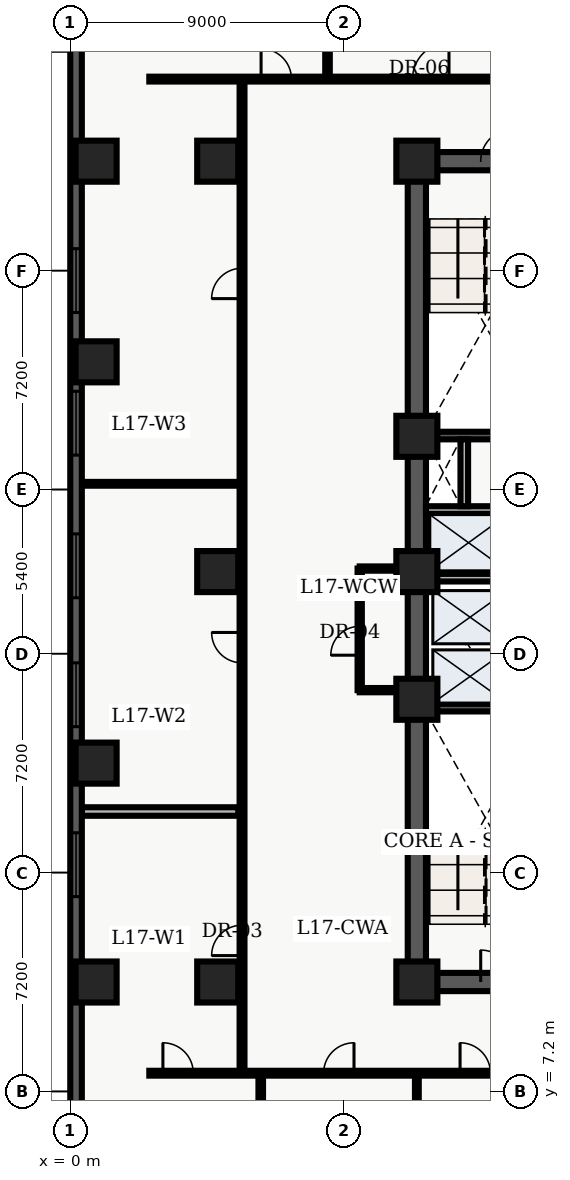
"""IFC4 building model, lengths in metres.
Left out: names, types, materials, properties, quantities, classifications, styles, units other than length and angle.
Written with IfcOpenShell. Run it as: python <this file> out.ifc"""

import sys

from ifc_helpers import new_model, entity, si_unit, converted_unit, direction, frame, origin_with_axes, origin_2d_with_axis, place, context, subcontext, project, spatial, polyline, rectangle, outline, extrude, element, fill, save


model = new_model("IFC4")
c1 = context("Model", 3, precision=1e-05, world=origin_with_axes(), true_north=direction((0.0, 1.0)))
c2 = subcontext(c1, "Body", "Model", "MODEL_VIEW")
j1 = project(units=[si_unit("LENGTHUNIT", "METRE"), converted_unit("PLANEANGLEUNIT", "DEGREE", entity("IfcPlaneAngleMeasure", 0.017), si_unit("PLANEANGLEUNIT", "RADIAN"), dimensions=[0, 0, 0, 0, 0, 0, 0])], contexts=[c1])
p1 = place(None, origin_with_axes())
s1 = spatial("IfcSite", under=j1, at=p1, CompositionType="ELEMENT")
p2 = place(p1, origin_with_axes())
s2 = spatial("IfcBuilding", under=s1, at=p2, CompositionType="ELEMENT")
p3 = place(p2, frame((0.0, 0.0, 71.7), z_axis=(0.0, 0.0, 1.0), x_axis=(1.0, 0.0, 0.0)))
s3 = spatial("IfcBuildingStorey", under=s2, at=p3, CompositionType="ELEMENT", Elevation=71.7)
p4 = place(p3, frame((11.4, 10.8, 0.0), z_axis=(0.0, 0.0, 1.0), x_axis=(0.0, 1.0, 0.0)))
e1 = element("IfcWall", 1, at=p4, inside=s3, PredefinedType="SHEAR", context=c2, shape_type="SweptSolid", body=[
    extrude(outline(polyline([(0.0, -0.3), (27.0, -0.3), (27.0, 0.3), (0.0, 0.3), (0.0, -0.3)])), origin_with_axes(), (0.0, 0.0, 1.0), 3.66),
])
p5 = place(p3, frame((11.4, 10.8, 0.0), z_axis=(0.0, 0.0, 1.0), x_axis=(1.0, 0.0, 0.0)))
e2 = element("IfcWall", 2, at=p5, inside=s3, PredefinedType="SHEAR", context=c2, shape_type="SweptSolid", body=[
    extrude(outline(polyline([(0.0, -0.3), (7.2, -0.3), (7.2, 0.3), (0.0, 0.3), (0.0, -0.3)])), origin_with_axes(), (0.0, 0.0, 1.0), 3.66),
])
p6 = place(p5, frame((2.625, 0.0, 0.0), z_axis=(0.0, 0.0, 1.0), x_axis=(1.0, 0.0, 0.0)))
e3 = element("IfcOpeningElement", 3, at=p6, cuts=e2, PredefinedType="OPENING", context=c2, shape_type="SweptSolid", body=[
    extrude(rectangle(XDim=1.05, YDim=0.62, at=origin_2d_with_axis()), origin_with_axes(), (0.0, 0.0, 1.0), 2.15),
])
p7 = place(p3, frame((11.4, 37.8, 0.0), z_axis=(0.0, 0.0, 1.0), x_axis=(1.0, 0.0, 0.0)))
e4 = element("IfcWall", 4, at=p7, inside=s3, PredefinedType="SHEAR", context=c2, shape_type="SweptSolid", body=[
    extrude(outline(polyline([(0.0, -0.3), (7.2, -0.3), (7.2, 0.3), (0.0, 0.3), (0.0, -0.3)])), origin_with_axes(), (0.0, 0.0, 1.0), 3.66),
])
p8 = place(p7, frame((2.625, 0.0, 0.0), z_axis=(0.0, 0.0, 1.0), x_axis=(1.0, 0.0, 0.0)))
e5 = element("IfcOpeningElement", 5, at=p8, cuts=e4, PredefinedType="OPENING", context=c2, shape_type="SweptSolid", body=[
    extrude(rectangle(XDim=1.05, YDim=0.62, at=origin_2d_with_axis()), origin_with_axes(), (0.0, 0.0, 1.0), 2.15),
])
for number, where, z_axis, x_axis in (
    (6, (11.7, 19.825, 0.0), (0.0, 0.0, 1.0), (1.0, 0.0, 0.0)),
    (7, (11.7, 28.775, 0.0), (0.0, 0.0, 1.0), (1.0, 0.0, 0.0)),
):
    element("IfcWall", number, at=place(p3, frame(where, z_axis=z_axis, x_axis=x_axis)), inside=s3, PredefinedType="SHEAR", context=c2, shape_type="SweptSolid", body=[
        extrude(outline(polyline([(0.0, -0.125), (6.6, -0.125), (6.6, 0.125), (0.0, 0.125), (0.0, -0.125)])), origin_with_axes(), (0.0, 0.0, 1.0), 3.66),
    ])
p9 = place(p3, frame((11.7, 24.1, 0.0), z_axis=(0.0, 0.0, 1.0), x_axis=(1.0, 0.0, 0.0)))
e8 = element("IfcWall", 8, at=p9, inside=s3, PredefinedType="SOLIDWALL", context=c2, shape_type="SweptSolid", body=[
    extrude(outline(polyline([(0.0, -0.125), (6.6, -0.125), (6.6, 0.125), (0.0, 0.125), (0.0, -0.125)])), origin_with_axes(), (0.0, 0.0, 1.0), 2.7),
])
p10 = place(p9, frame((3.75, 0.0, 0.0), z_axis=(0.0, 0.0, 1.0), x_axis=(1.0, 0.0, 0.0)))
e9 = element("IfcOpeningElement", 9, at=p10, cuts=e8, PredefinedType="OPENING", context=c2, shape_type="SweptSolid", body=[
    extrude(rectangle(XDim=0.9, YDim=0.27, at=origin_2d_with_axis()), origin_with_axes(), (0.0, 0.0, 1.0), 2.15),
])
p11 = place(p3, frame((11.7, 26.325, 0.0), z_axis=(0.0, 0.0, 1.0), x_axis=(1.0, 0.0, 0.0)))
e10 = element("IfcWall", 10, at=p11, inside=s3, PredefinedType="SOLIDWALL", context=c2, shape_type="SweptSolid", body=[
    extrude(outline(polyline([(0.0, -0.125), (6.6, -0.125), (6.6, 0.125), (0.0, 0.125), (0.0, -0.125)])), origin_with_axes(), (0.0, 0.0, 1.0), 2.7),
])
p12 = place(p11, frame((3.5, 0.0, 0.0), z_axis=(0.0, 0.0, 1.0), x_axis=(1.0, 0.0, 0.0)))
e11 = element("IfcOpeningElement", 11, at=p12, cuts=e10, PredefinedType="OPENING", context=c2, shape_type="SweptSolid", body=[
    extrude(rectangle(XDim=0.9, YDim=0.27, at=origin_2d_with_axis()), origin_with_axes(), (0.0, 0.0, 1.0), 2.15),
])
p13 = place(p3, frame((12.96, 26.45, 0.0), z_axis=(0.0, 0.0, 1.0), x_axis=(0.0, 1.0, 0.0)))
e12 = element("IfcWall", 12, at=p13, inside=s3, PredefinedType="SOLIDWALL", context=c2, shape_type="SweptSolid", body=[
    extrude(outline(polyline([(0.0, -0.125), (2.2, -0.125), (2.2, 0.125), (0.0, 0.125), (0.0, -0.125)])), origin_with_axes(), (0.0, 0.0, 1.0), 2.7),
])
for number, where, z_axis, x_axis in (
    (13, (11.4, 10.8, 0.0), (0.0, 0.0, 1.0), (1.0, 0.0, 0.0)),
    (14, (11.4, 20.1, 0.0), (0.0, 0.0, 1.0), (1.0, 0.0, 0.0)),
    (15, (11.4, 24.3, 0.0), (0.0, 0.0, 1.0), (1.0, 0.0, 0.0)),
    (16, (11.4, 28.75, 0.0), (0.0, 0.0, 1.0), (1.0, 0.0, 0.0)),
    (17, (11.4, 37.8, 0.0), (0.0, 0.0, 1.0), (1.0, 0.0, 0.0)),
    (18, (4.85, 10.8, 0.0), (0.0, 0.0, 1.0), (1.0, 0.0, 0.0)),
    (19, (4.85, 24.3, 0.0), (0.0, 0.0, 1.0), (1.0, 0.0, 0.0)),
    (20, (4.85, 37.8, 0.0), (0.0, 0.0, 1.0), (1.0, 0.0, 0.0)),
    (21, (0.85, 10.8, 0.0), (0.0, 0.0, 1.0), (1.0, 0.0, 0.0)),
    (22, (0.85, 18.0, 0.0), (0.0, 0.0, 1.0), (1.0, 0.0, 0.0)),
    (23, (0.85, 31.2, 0.0), (0.0, 0.0, 1.0), (1.0, 0.0, 0.0)),
    (24, (0.85, 37.8, 0.0), (0.0, 0.0, 1.0), (1.0, 0.0, 0.0)),
):
    element("IfcColumn", number, at=place(p3, frame(where, z_axis=z_axis, x_axis=x_axis)), inside=s3, PredefinedType="COLUMN", context=c2, shape_type="SweptSolid", body=[
        extrude(rectangle(XDim=1.35, YDim=1.35, at=origin_2d_with_axis()), origin_with_axes(), (0.0, 0.0, 1.0), 3.9),
    ])
p14 = place(p3, frame((9.52, 20.4, 0.0), z_axis=(0.0, 0.0, 1.0), x_axis=(0.0, 1.0, 0.0)))
e25 = element("IfcWall", 25, at=p14, inside=s3, PredefinedType="PARTITIONING", context=c2, shape_type="SweptSolid", body=[
    extrude(outline(polyline([(0.0, -0.07), (4.0, -0.07), (4.0, 0.07), (0.0, 0.07), (0.0, -0.07)])), origin_with_axes(), (0.0, 0.0, 1.0), 2.7),
])
p15 = place(p14, frame((1.625, 0.0, 0.0), z_axis=(0.0, 0.0, 1.0), x_axis=(1.0, 0.0, 0.0)))
e26 = element("IfcOpeningElement", 26, at=p15, cuts=e25, PredefinedType="OPENING", context=c2, shape_type="SweptSolid", body=[
    extrude(rectangle(XDim=0.95, YDim=0.16, at=origin_2d_with_axis()), origin_with_axes(), (0.0, 0.0, 1.0), 2.15),
])
for number, where, z_axis, x_axis in (
    (27, (9.52, 20.4, 0.0), (0.0, 0.0, 1.0), (1.0, 0.0, 0.0)),
    (28, (9.52, 24.4, 0.0), (0.0, 0.0, 1.0), (1.0, 0.0, 0.0)),
):
    element("IfcWall", number, at=place(p3, frame(where, z_axis=z_axis, x_axis=x_axis)), inside=s3, PredefinedType="PARTITIONING", context=c2, shape_type="SweptSolid", body=[
        extrude(outline(polyline([(0.0, -0.07), (1.58, -0.07), (1.58, 0.07), (0.0, 0.07), (0.0, -0.07)])), origin_with_axes(), (0.0, 0.0, 1.0), 2.7),
    ])
p16 = place(p3, frame((2.6, 7.8, 0.0), z_axis=(0.0, 0.0, 1.0), x_axis=(1.0, 0.0, 0.0)))
e29 = element("IfcWall", 29, at=p16, inside=s3, PredefinedType="PARTITIONING", context=c2, shape_type="SweptSolid", body=[
    extrude(outline(polyline([(0.0, -0.08), (18.55, -0.08), (18.55, 0.08), (0.0, 0.08), (0.0, -0.08)])), origin_with_axes(), (0.0, 0.0, 1.0), 2.7),
])
p17 = place(p16, frame((0.947, 0.0, 0.0), z_axis=(0.0, 0.0, 1.0), x_axis=(1.0, 0.0, 0.0)))
e30 = element("IfcOpeningElement", 30, at=p17, cuts=e29, PredefinedType="OPENING", context=c2, shape_type="SweptSolid", body=[
    extrude(rectangle(XDim=1.0, YDim=0.18, at=origin_2d_with_axis()), origin_with_axes(), (0.0, 0.0, 1.0), 2.15),
])
p18 = place(p16, frame((6.232, 0.0, 0.0), z_axis=(0.0, 0.0, 1.0), x_axis=(1.0, 0.0, 0.0)))
e31 = element("IfcOpeningElement", 31, at=p18, cuts=e29, PredefinedType="OPENING", context=c2, shape_type="SweptSolid", body=[
    extrude(rectangle(XDim=1.0, YDim=0.18, at=origin_2d_with_axis()), origin_with_axes(), (0.0, 0.0, 1.0), 2.15),
])
p19 = place(p16, frame((10.721, 0.0, 0.0), z_axis=(0.0, 0.0, 1.0), x_axis=(1.0, 0.0, 0.0)))
e32 = element("IfcOpeningElement", 32, at=p19, cuts=e29, PredefinedType="OPENING", context=c2, shape_type="SweptSolid", body=[
    extrude(rectangle(XDim=1.0, YDim=0.18, at=origin_2d_with_axis()), origin_with_axes(), (0.0, 0.0, 1.0), 2.15),
])
p20 = place(p16, frame((15.571, 0.0, 0.0), z_axis=(0.0, 0.0, 1.0), x_axis=(1.0, 0.0, 0.0)))
e33 = element("IfcOpeningElement", 33, at=p20, cuts=e29, PredefinedType="OPENING", context=c2, shape_type="SweptSolid", body=[
    extrude(rectangle(XDim=1.0, YDim=0.18, at=origin_2d_with_axis()), origin_with_axes(), (0.0, 0.0, 1.0), 2.15),
])
p21 = place(p3, frame((2.6, 40.5, 0.0), z_axis=(0.0, 0.0, 1.0), x_axis=(1.0, 0.0, 0.0)))
e34 = element("IfcWall", 34, at=p21, inside=s3, PredefinedType="PARTITIONING", context=c2, shape_type="SweptSolid", body=[
    extrude(outline(polyline([(0.0, -0.08), (18.65, -0.08), (18.65, 0.08), (0.0, 0.08), (0.0, -0.08)])), origin_with_axes(), (0.0, 0.0, 1.0), 2.7),
])
p22 = place(p21, frame((4.176, 0.0, 0.0), z_axis=(0.0, 0.0, 1.0), x_axis=(1.0, 0.0, 0.0)))
e35 = element("IfcOpeningElement", 35, at=p22, cuts=e34, PredefinedType="OPENING", context=c2, shape_type="SweptSolid", body=[
    extrude(rectangle(XDim=1.0, YDim=0.18, at=origin_2d_with_axis()), origin_with_axes(), (0.0, 0.0, 1.0), 2.15),
])
p23 = place(p21, frame((9.257, 0.0, 0.0), z_axis=(0.0, 0.0, 1.0), x_axis=(1.0, 0.0, 0.0)))
e36 = element("IfcOpeningElement", 36, at=p23, cuts=e34, PredefinedType="OPENING", context=c2, shape_type="SweptSolid", body=[
    extrude(rectangle(XDim=1.2, YDim=0.18, at=origin_2d_with_axis()), origin_with_axes(), (0.0, 0.0, 1.0), 2.2),
])
p24 = place(p21, frame((14.536, 0.0, 0.0), z_axis=(0.0, 0.0, 1.0), x_axis=(1.0, 0.0, 0.0)))
e37 = element("IfcOpeningElement", 37, at=p24, cuts=e34, PredefinedType="OPENING", context=c2, shape_type="SweptSolid", body=[
    extrude(rectangle(XDim=1.0, YDim=0.18, at=origin_2d_with_axis()), origin_with_axes(), (0.0, 0.0, 1.0), 2.15),
])
p25 = place(p3, frame((5.65, 7.8, 0.0), z_axis=(0.0, 0.0, 1.0), x_axis=(0.0, 1.0, 0.0)))
e38 = element("IfcWall", 38, at=p25, inside=s3, PredefinedType="PARTITIONING", context=c2, shape_type="SweptSolid", body=[
    extrude(outline(polyline([(0.0, -0.08), (32.7, -0.08), (32.7, 0.08), (0.0, 0.08), (0.0, -0.08)])), origin_with_axes(), (0.0, 0.0, 1.0), 2.7),
])
p26 = place(p25, frame((4.369, 0.0, 0.0), z_axis=(0.0, 0.0, 1.0), x_axis=(1.0, 0.0, 0.0)))
e39 = element("IfcOpeningElement", 39, at=p26, cuts=e38, PredefinedType="OPENING", context=c2, shape_type="SweptSolid", body=[
    extrude(rectangle(XDim=1.0, YDim=0.18, at=origin_2d_with_axis()), origin_with_axes(), (0.0, 0.0, 1.0), 2.15),
])
p27 = place(p25, frame((13.998, 0.0, 0.0), z_axis=(0.0, 0.0, 1.0), x_axis=(1.0, 0.0, 0.0)))
e40 = element("IfcOpeningElement", 40, at=p27, cuts=e38, PredefinedType="OPENING", context=c2, shape_type="SweptSolid", body=[
    extrude(rectangle(XDim=1.0, YDim=0.18, at=origin_2d_with_axis()), origin_with_axes(), (0.0, 0.0, 1.0), 2.15),
])
p28 = place(p25, frame((25.979, 0.0, 0.0), z_axis=(0.0, 0.0, 1.0), x_axis=(1.0, 0.0, 0.0)))
e41 = element("IfcOpeningElement", 41, at=p28, cuts=e38, PredefinedType="OPENING", context=c2, shape_type="SweptSolid", body=[
    extrude(rectangle(XDim=1.0, YDim=0.18, at=origin_2d_with_axis()), origin_with_axes(), (0.0, 0.0, 1.0), 2.15),
])
p29 = place(p3, frame((0.375, 16.408, 0.0), z_axis=(0.0, 0.0, 1.0), x_axis=(1.0, 0.0, 0.0)))
e42 = element("IfcWall", 42, at=p29, inside=s3, PredefinedType="PARTITIONING", context=c2, shape_type="SweptSolid", body=[
    extrude(outline(polyline([(0.0, -0.14), (5.155, -0.14), (5.155, 0.14), (0.0, 0.14), (0.0, -0.14)])), origin_with_axes(), (0.0, 0.0, 1.0), 2.7),
])
p30 = place(p3, frame((0.375, 27.188, 0.0), z_axis=(0.0, 0.0, 1.0), x_axis=(1.0, 0.0, 0.0)))
e43 = element("IfcWall", 43, at=p30, inside=s3, PredefinedType="PARTITIONING", context=c2, shape_type="SweptSolid", body=[
    extrude(outline(polyline([(0.0, -0.062), (5.155, -0.062), (5.155, 0.062), (0.0, 0.062), (0.0, -0.062)])), origin_with_axes(), (0.0, 0.0, 1.0), 2.7),
])
p31 = place(p3, frame((6.265, 0.36, 0.0), z_axis=(0.0, 0.0, 1.0), x_axis=(0.0, 1.0, 0.0)))
e44 = element("IfcWall", 44, at=p31, inside=s3, PredefinedType="PARTITIONING", context=c2, shape_type="SweptSolid", body=[
    extrude(outline(polyline([(0.0, -0.075), (7.34, -0.075), (7.34, 0.075), (0.0, 0.075), (0.0, -0.075)])), origin_with_axes(), (0.0, 0.0, 1.0), 2.7),
])
p32 = place(p3, frame((11.4, 0.36, 0.0), z_axis=(0.0, 0.0, 1.0), x_axis=(0.0, 1.0, 0.0)))
e45 = element("IfcWall", 45, at=p32, inside=s3, PredefinedType="PARTITIONING", context=c2, shape_type="SweptSolid", body=[
    extrude(outline(polyline([(0.0, -0.062), (7.34, -0.062), (7.34, 0.062), (0.0, 0.062), (0.0, -0.062)])), origin_with_axes(), (0.0, 0.0, 1.0), 2.7),
])
p33 = place(p3, frame((8.461, 40.6, 0.0), z_axis=(0.0, 0.0, 1.0), x_axis=(0.0, 1.0, 0.0)))
e46 = element("IfcWall", 46, at=p33, inside=s3, PredefinedType="PARTITIONING", context=c2, shape_type="SweptSolid", body=[
    extrude(outline(polyline([(0.0, -0.075), (7.64, -0.075), (7.64, 0.075), (0.0, 0.075), (0.0, -0.075)])), origin_with_axes(), (0.0, 0.0, 1.0), 2.7),
])
p34 = place(p3, frame((0.19, 2.78, 0.0), z_axis=(0.0, 0.0, 1.0), x_axis=(0.0, 1.0, 0.0)))
e47 = element("IfcWall", 47, at=p34, inside=s3, PredefinedType="SOLIDWALL", context=c2, shape_type="SweptSolid", body=[
    extrude(outline(polyline([(0.0, -0.19), (43.42, -0.19), (43.42, 0.19), (0.0, 0.19), (0.0, -0.19)])), origin_with_axes(), (0.0, 0.0, 1.0), 3.66),
])
p35 = place(p34, frame((2.946, 0.0, 0.45), z_axis=(0.0, 0.0, 1.0), x_axis=(1.0, 0.0, 0.0)))
e48 = element("IfcOpeningElement", 48, at=p35, cuts=e47, PredefinedType="OPENING", context=c2, shape_type="SweptSolid", body=[
    extrude(rectangle(XDim=2.1, YDim=0.4, at=origin_2d_with_axis()), origin_with_axes(), (0.0, 0.0, 1.0), 2.2),
])
p36 = place(p34, frame((11.878, 0.0, 0.45), z_axis=(0.0, 0.0, 1.0), x_axis=(1.0, 0.0, 0.0)))
e49 = element("IfcOpeningElement", 49, at=p36, cuts=e47, PredefinedType="OPENING", context=c2, shape_type="SweptSolid", body=[
    extrude(rectangle(XDim=2.1, YDim=0.4, at=origin_2d_with_axis()), origin_with_axes(), (0.0, 0.0, 1.0), 2.2),
])
p37 = place(p34, frame((17.469, 0.0, 0.45), z_axis=(0.0, 0.0, 1.0), x_axis=(1.0, 0.0, 0.0)))
e50 = element("IfcOpeningElement", 50, at=p37, cuts=e47, PredefinedType="OPENING", context=c2, shape_type="SweptSolid", body=[
    extrude(rectangle(XDim=2.1, YDim=0.4, at=origin_2d_with_axis()), origin_with_axes(), (0.0, 0.0, 1.0), 2.2),
])
p38 = place(p34, frame((21.71, 0.0, 0.45), z_axis=(0.0, 0.0, 1.0), x_axis=(1.0, 0.0, 0.0)))
e51 = element("IfcOpeningElement", 51, at=p38, cuts=e47, PredefinedType="OPENING", context=c2, shape_type="SweptSolid", body=[
    extrude(rectangle(XDim=2.1, YDim=0.4, at=origin_2d_with_axis()), origin_with_axes(), (0.0, 0.0, 1.0), 2.2),
])
p39 = place(p34, frame((26.401, 0.0, 0.45), z_axis=(0.0, 0.0, 1.0), x_axis=(1.0, 0.0, 0.0)))
e52 = element("IfcOpeningElement", 52, at=p39, cuts=e47, PredefinedType="OPENING", context=c2, shape_type="SweptSolid", body=[
    extrude(rectangle(XDim=2.1, YDim=0.4, at=origin_2d_with_axis()), origin_with_axes(), (0.0, 0.0, 1.0), 2.2),
])
p40 = place(p34, frame((31.092, 0.0, 0.45), z_axis=(0.0, 0.0, 1.0), x_axis=(1.0, 0.0, 0.0)))
e53 = element("IfcOpeningElement", 53, at=p40, cuts=e47, PredefinedType="OPENING", context=c2, shape_type="SweptSolid", body=[
    extrude(rectangle(XDim=2.1, YDim=0.4, at=origin_2d_with_axis()), origin_with_axes(), (0.0, 0.0, 1.0), 2.2),
])
p41 = place(p34, frame((40.024, 0.0, 0.45), z_axis=(0.0, 0.0, 1.0), x_axis=(1.0, 0.0, 0.0)))
e54 = element("IfcOpeningElement", 54, at=p41, cuts=e47, PredefinedType="OPENING", context=c2, shape_type="SweptSolid", body=[
    extrude(rectangle(XDim=2.1, YDim=0.4, at=origin_2d_with_axis()), origin_with_axes(), (0.0, 0.0, 1.0), 2.2),
])
p42 = place(p5, frame((2.625, 0.0, 0.0), z_axis=(0.0, 0.0, 1.0), x_axis=(1.0, 0.0, 0.0)))
e55 = element("IfcDoor", 55, at=p42, inside=s3, OperationType="SINGLE_SWING_LEFT", PredefinedType="DOOR", context=c2, shape_type="SweptSolid", body=[
    extrude(rectangle(XDim=1.05, YDim=0.09, at=origin_2d_with_axis()), origin_with_axes(), (0.0, 0.0, 1.0), 2.15),
])
fill(e3, e55)
p43 = place(p7, frame((2.625, 0.0, 0.0), z_axis=(0.0, 0.0, 1.0), x_axis=(1.0, 0.0, 0.0)))
e56 = element("IfcDoor", 56, at=p43, inside=s3, OperationType="SINGLE_SWING_RIGHT", PredefinedType="DOOR", context=c2, shape_type="SweptSolid", body=[
    extrude(rectangle(XDim=1.05, YDim=0.09, at=origin_2d_with_axis()), origin_with_axes(), (0.0, 0.0, 1.0), 2.15),
])
fill(e5, e56)
p44 = place(p14, frame((1.625, 0.0, 0.0), z_axis=(0.0, 0.0, 1.0), x_axis=(1.0, 0.0, 0.0)))
e57 = element("IfcDoor", 57, at=p44, inside=s3, OperationType="SINGLE_SWING_LEFT", PredefinedType="DOOR", context=c2, shape_type="SweptSolid", body=[
    extrude(rectangle(XDim=0.95, YDim=0.084, at=origin_2d_with_axis()), origin_with_axes(), (0.0, 0.0, 1.0), 2.15),
])
fill(e26, e57)
p45 = place(p25, frame((4.369, 0.0, 0.0), z_axis=(0.0, 0.0, 1.0), x_axis=(1.0, 0.0, 0.0)))
e58 = element("IfcDoor", 58, at=p45, inside=s3, OperationType="SINGLE_SWING_LEFT", PredefinedType="DOOR", context=c2, shape_type="SweptSolid", body=[
    extrude(rectangle(XDim=1.0, YDim=0.09, at=origin_2d_with_axis()), origin_with_axes(), (0.0, 0.0, 1.0), 2.15),
])
fill(e39, e58)
p46 = place(p25, frame((13.998, 0.0, 0.0), z_axis=(0.0, 0.0, 1.0), x_axis=(1.0, 0.0, 0.0)))
e59 = element("IfcDoor", 59, at=p46, inside=s3, OperationType="SINGLE_SWING_RIGHT", PredefinedType="DOOR", context=c2, shape_type="SweptSolid", body=[
    extrude(rectangle(XDim=1.0, YDim=0.09, at=origin_2d_with_axis()), origin_with_axes(), (0.0, 0.0, 1.0), 2.15),
])
fill(e40, e59)
p47 = place(p25, frame((25.979, 0.0, 0.0), z_axis=(0.0, 0.0, 1.0), x_axis=(1.0, 0.0, 0.0)))
e60 = element("IfcDoor", 60, at=p47, inside=s3, OperationType="SINGLE_SWING_LEFT", PredefinedType="DOOR", context=c2, shape_type="SweptSolid", body=[
    extrude(rectangle(XDim=1.0, YDim=0.09, at=origin_2d_with_axis()), origin_with_axes(), (0.0, 0.0, 1.0), 2.15),
])
fill(e41, e60)
p48 = place(p16, frame((0.947, 0.0, 0.0), z_axis=(0.0, 0.0, 1.0), x_axis=(1.0, 0.0, 0.0)))
e61 = element("IfcDoor", 61, at=p48, inside=s3, OperationType="SINGLE_SWING_LEFT", PredefinedType="DOOR", context=c2, shape_type="SweptSolid", body=[
    extrude(rectangle(XDim=1.0, YDim=0.09, at=origin_2d_with_axis()), origin_with_axes(), (0.0, 0.0, 1.0), 2.15),
])
fill(e30, e61)
p49 = place(p16, frame((6.232, 0.0, 0.0), z_axis=(0.0, 0.0, 1.0), x_axis=(1.0, 0.0, 0.0)))
e62 = element("IfcDoor", 62, at=p49, inside=s3, OperationType="SINGLE_SWING_RIGHT", PredefinedType="DOOR", context=c2, shape_type="SweptSolid", body=[
    extrude(rectangle(XDim=1.0, YDim=0.09, at=origin_2d_with_axis()), origin_with_axes(), (0.0, 0.0, 1.0), 2.15),
])
fill(e31, e62)
p50 = place(p16, frame((10.721, 0.0, 0.0), z_axis=(0.0, 0.0, 1.0), x_axis=(1.0, 0.0, 0.0)))
e63 = element("IfcDoor", 63, at=p50, inside=s3, OperationType="SINGLE_SWING_LEFT", PredefinedType="DOOR", context=c2, shape_type="SweptSolid", body=[
    extrude(rectangle(XDim=1.0, YDim=0.09, at=origin_2d_with_axis()), origin_with_axes(), (0.0, 0.0, 1.0), 2.15),
])
fill(e32, e63)
p51 = place(p21, frame((4.176, 0.0, 0.0), z_axis=(0.0, 0.0, 1.0), x_axis=(1.0, 0.0, 0.0)))
e64 = element("IfcDoor", 64, at=p51, inside=s3, OperationType="SINGLE_SWING_LEFT", PredefinedType="DOOR", context=c2, shape_type="SweptSolid", body=[
    extrude(rectangle(XDim=1.0, YDim=0.09, at=origin_2d_with_axis()), origin_with_axes(), (0.0, 0.0, 1.0), 2.15),
])
fill(e35, e64)
p52 = place(p21, frame((9.257, 0.0, 0.0), z_axis=(0.0, 0.0, 1.0), x_axis=(1.0, 0.0, 0.0)))
e65 = element("IfcDoor", 65, at=p52, inside=s3, OperationType="SINGLE_SWING_RIGHT", PredefinedType="DOOR", context=c2, shape_type="SweptSolid", body=[
    extrude(rectangle(XDim=1.2, YDim=0.09, at=origin_2d_with_axis()), origin_with_axes(), (0.0, 0.0, 1.0), 2.2),
])
fill(e36, e65)
p53 = place(p34, frame((11.878, 0.0, 0.45), z_axis=(0.0, 0.0, 1.0), x_axis=(1.0, 0.0, 0.0)))
e66 = element("IfcWindow", 66, at=p53, inside=s3, PredefinedType="WINDOW", context=c2, shape_type="SweptSolid", body=[
    extrude(rectangle(XDim=2.1, YDim=0.09, at=origin_2d_with_axis()), origin_with_axes(), (0.0, 0.0, 1.0), 2.2),
])
fill(e49, e66)
p54 = place(p34, frame((17.469, 0.0, 0.45), z_axis=(0.0, 0.0, 1.0), x_axis=(1.0, 0.0, 0.0)))
e67 = element("IfcWindow", 67, at=p54, inside=s3, PredefinedType="WINDOW", context=c2, shape_type="SweptSolid", body=[
    extrude(rectangle(XDim=2.1, YDim=0.09, at=origin_2d_with_axis()), origin_with_axes(), (0.0, 0.0, 1.0), 2.2),
])
fill(e50, e67)
p55 = place(p34, frame((21.71, 0.0, 0.45), z_axis=(0.0, 0.0, 1.0), x_axis=(1.0, 0.0, 0.0)))
e68 = element("IfcWindow", 68, at=p55, inside=s3, PredefinedType="WINDOW", context=c2, shape_type="SweptSolid", body=[
    extrude(rectangle(XDim=2.1, YDim=0.09, at=origin_2d_with_axis()), origin_with_axes(), (0.0, 0.0, 1.0), 2.2),
])
fill(e51, e68)
p56 = place(p34, frame((26.401, 0.0, 0.45), z_axis=(0.0, 0.0, 1.0), x_axis=(1.0, 0.0, 0.0)))
e69 = element("IfcWindow", 69, at=p56, inside=s3, PredefinedType="WINDOW", context=c2, shape_type="SweptSolid", body=[
    extrude(rectangle(XDim=2.1, YDim=0.09, at=origin_2d_with_axis()), origin_with_axes(), (0.0, 0.0, 1.0), 2.2),
])
fill(e52, e69)
p57 = place(p34, frame((31.092, 0.0, 0.45), z_axis=(0.0, 0.0, 1.0), x_axis=(1.0, 0.0, 0.0)))
e70 = element("IfcWindow", 70, at=p57, inside=s3, PredefinedType="WINDOW", context=c2, shape_type="SweptSolid", body=[
    extrude(rectangle(XDim=2.1, YDim=0.09, at=origin_2d_with_axis()), origin_with_axes(), (0.0, 0.0, 1.0), 2.2),
])
fill(e53, e70)
save(model, sys.argv[1])
